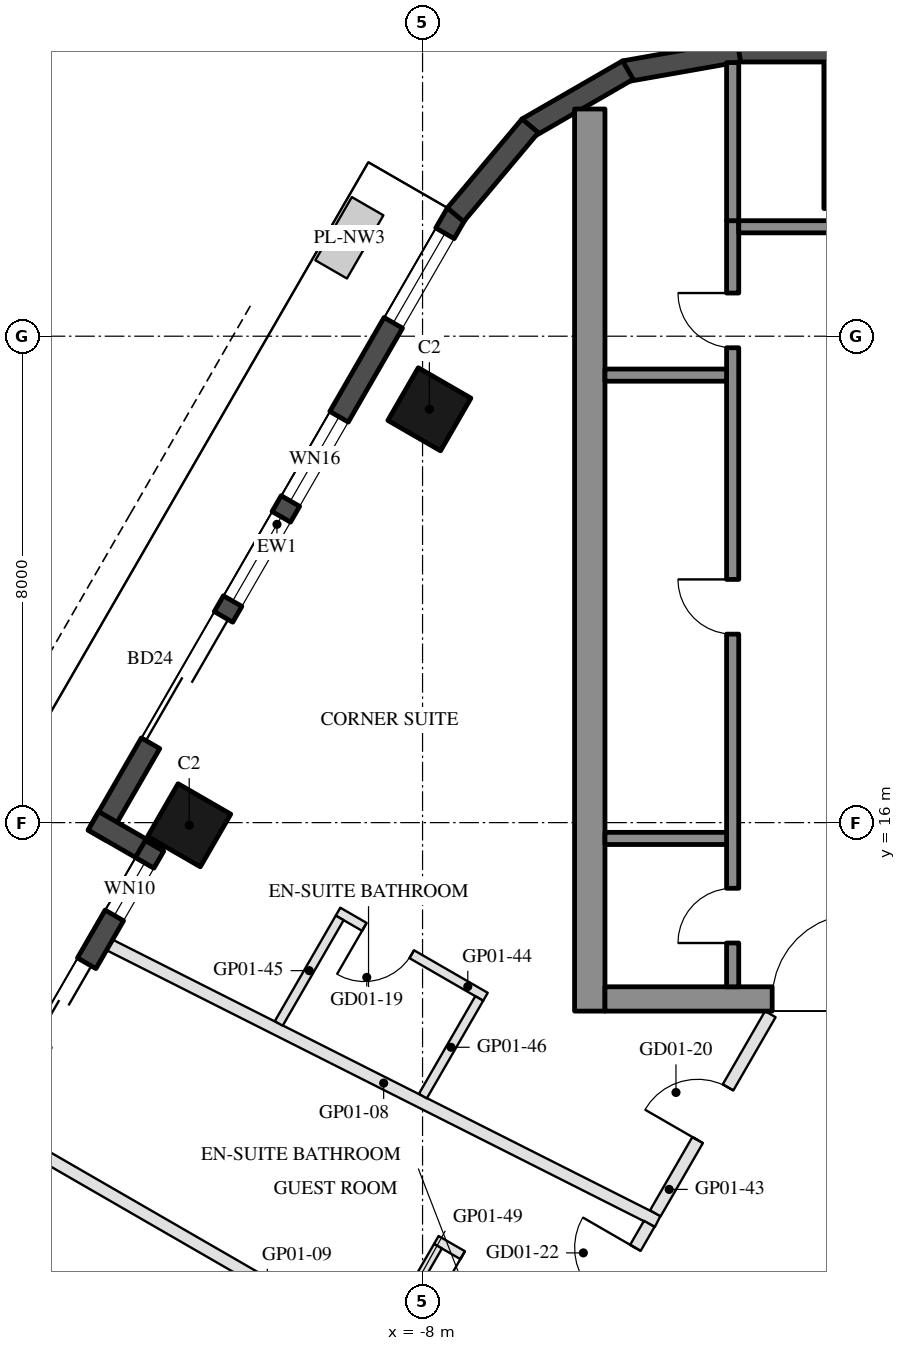
"""IFC4 building model, lengths in metres.
Left out: names, types, materials, properties, quantities, classifications, styles, units other than length and angle.
Written with IfcOpenShell. Run it as: python <this file> out.ifc"""

import sys

from ifc_helpers import new_model, si_unit, direction, frame, frame_2d, origin, origin_2d, place, context, subcontext, project, spatial, rectangle, hollow_rectangle, extrude, element, fill, save


model = new_model("IFC4")
c1 = context("Model", 3, precision=1e-05, world=origin(), true_north=direction((0.0, 1.0)))
c2 = subcontext(c1, "Body", "Model", "MODEL_VIEW")
j1 = project(units=[si_unit("LENGTHUNIT", "METRE"), si_unit("PLANEANGLEUNIT", "RADIAN")], contexts=[c1])
p1 = place(None, origin())
s1 = spatial("IfcSite", under=j1, at=p1, CompositionType="ELEMENT")
p2 = place(p1, origin())
s2 = spatial("IfcBuilding", under=s1, at=p2, CompositionType="ELEMENT")
p3 = place(p2, frame((0.0, 0.0, 46.5)))
s3 = spatial("IfcBuildingStorey", under=s2, at=p3, CompositionType="ELEMENT", Elevation=46.5)
for number, where, z_axis, x_axis in (
    (1, (-7.888, 22.798, 0.0), (0.0, 0.0, 1.0), (0.5, 0.866, 0.0)),
    (2, (-11.838, 15.957, 0.0), (0.0, 0.0, 1.0), (0.5, 0.866, 0.0)),
):
    element("IfcColumn", number, at=place(p3, frame(where, z_axis=z_axis, x_axis=x_axis)), inside=s3, PredefinedType="COLUMN", context=c2, shape_type="SweptSolid", body=[
        extrude(hollow_rectangle(XDim=1.0, YDim=1.0, WallThickness=0.045, at=origin_2d()), origin(), (0.0, 0.0, 1.0), 3.7),
    ])
p4 = place(p3, frame((0.0, 27.3, 0.0), z_axis=(0.0, 0.0, 1.0), x_axis=(1.0, 0.0, 0.0)))
e3 = element("IfcColumn", 3, at=p4, inside=s3, PredefinedType="COLUMN", context=c2, shape_type="SweptSolid", body=[
    extrude(hollow_rectangle(XDim=2.8, YDim=2.4, WallThickness=0.07, at=origin_2d()), origin(), (0.0, 0.0, 1.0), 3.7),
])
p5 = place(p3, frame((-7.441, 26.022, 0.0), z_axis=(0.0, 0.0, 1.0), x_axis=(-0.499992533062, -0.86602971478, 0.0)))
e4 = element("IfcWall", 4, at=p5, inside=s3, PredefinedType="SOLIDWALL", context=c2, shape_type="SweptSolid", body=[
    extrude(rectangle(XDim=11.816, YDim=0.35, at=frame_2d((5.908, 0.0))), origin(), (0.0, 0.0, 1.0), 3.55),
])
p6 = place(p5, frame((0.381, 0.0, 0.3)))
e5 = element("IfcOpeningElement", 5, at=p6, cuts=e4, PredefinedType="OPENING", context=c2, shape_type="SweptSolid", body=[
    extrude(rectangle(XDim=1.7, YDim=2.65, at=frame_2d((0.85, 1.325))), frame((0.0, 0.185, 0.0), z_axis=(0.0, -1.0, 0.0), x_axis=(1.0, 0.0, 0.0)), (0.0, 0.0, 1.0), 0.37),
])
p7 = place(p5, frame((7.666, 0.0, 0.0)))
e6 = element("IfcOpeningElement", 6, at=p7, cuts=e4, PredefinedType="OPENING", context=c2, shape_type="SweptSolid", body=[
    extrude(rectangle(XDim=2.4, YDim=2.4, at=frame_2d((1.2, 1.2))), frame((0.0, 0.185, 0.0), z_axis=(0.0, -1.0, 0.0), x_axis=(1.0, 0.0, 0.0)), (0.0, 0.0, 1.0), 0.37),
])
p8 = place(p5, frame((3.865, 0.0, 0.3)))
e7 = element("IfcOpeningElement", 7, at=p8, cuts=e4, PredefinedType="OPENING", context=c2, shape_type="SweptSolid", body=[
    extrude(rectangle(XDim=1.6, YDim=2.65, at=frame_2d((0.8, 1.325))), frame((0.0, 0.185, 0.0), z_axis=(0.0, -1.0, 0.0), x_axis=(1.0, 0.0, 0.0)), (0.0, 0.0, 1.0), 0.37),
])
p9 = place(p5, frame((5.765, 0.0, 0.3)))
e8 = element("IfcOpeningElement", 8, at=p9, cuts=e4, PredefinedType="OPENING", context=c2, shape_type="SweptSolid", body=[
    extrude(rectangle(XDim=1.6, YDim=2.65, at=frame_2d((0.8, 1.325))), frame((0.0, 0.185, 0.0), z_axis=(0.0, -1.0, 0.0), x_axis=(1.0, 0.0, 0.0)), (0.0, 0.0, 1.0), 0.37),
])
p10 = place(p3, frame((-13.413, 16.029, 0.0), z_axis=(0.0, 0.0, 1.0), x_axis=(0.866005645448, -0.500034220881, 0.0)))
e9 = element("IfcWall", 9, at=p10, inside=s3, PredefinedType="SOLIDWALL", context=c2, shape_type="SweptSolid", body=[
    extrude(rectangle(XDim=1.22, YDim=0.35, at=frame_2d((0.61, 0.0))), origin(), (0.0, 0.0, 1.0), 3.55),
])
p11 = place(p3, frame((-12.409, 15.617, 0.0), z_axis=(0.0, 0.0, 1.0), x_axis=(-0.500003597184, -0.866023326939, 0.0)))
e10 = element("IfcWall", 10, at=p11, inside=s3, PredefinedType="SOLIDWALL", context=c2, shape_type="SweptSolid", body=[
    extrude(rectangle(XDim=6.74, YDim=0.35, at=frame_2d((3.37, 0.0))), origin(), (0.0, 0.0, 1.0), 3.55),
])
p12 = place(p11, frame((0.32, 0.0, 0.3)))
e11 = element("IfcOpeningElement", 11, at=p12, cuts=e10, PredefinedType="OPENING", context=c2, shape_type="SweptSolid", body=[
    extrude(rectangle(XDim=1.0, YDim=2.65, at=frame_2d((0.5, 1.325))), frame((0.0, 0.185, 0.0), z_axis=(0.0, -1.0, 0.0), x_axis=(1.0, 0.0, 0.0)), (0.0, 0.0, 1.0), 0.37),
])
p13 = place(p11, frame((2.229, 0.0, 0.0)))
e12 = element("IfcOpeningElement", 12, at=p13, cuts=e10, PredefinedType="OPENING", context=c2, shape_type="SweptSolid", body=[
    extrude(rectangle(XDim=1.5, YDim=2.4, at=frame_2d((0.75, 1.2))), frame((0.0, 0.185, 0.0), z_axis=(0.0, -1.0, 0.0), x_axis=(1.0, 0.0, 0.0)), (0.0, 0.0, 1.0), 0.37),
])
p14 = place(p11, frame((4.029, 0.0, 0.3)))
e13 = element("IfcOpeningElement", 13, at=p14, cuts=e10, PredefinedType="OPENING", context=c2, shape_type="SweptSolid", body=[
    extrude(rectangle(XDim=0.8, YDim=2.65, at=frame_2d((0.4, 1.325))), frame((0.0, 0.185, 0.0), z_axis=(0.0, -1.0, 0.0), x_axis=(1.0, 0.0, 0.0)), (0.0, 0.0, 1.0), 0.37),
])
p15 = place(p3, frame((2.829, 28.685, 0.0), z_axis=(0.0, 0.0, 1.0), x_axis=(-1.0, 0.0, 0.0)))
e14 = element("IfcWall", 14, at=p15, inside=s3, PredefinedType="SOLIDWALL", context=c2, shape_type="SweptSolid", body=[
    extrude(rectangle(XDim=5.658, YDim=0.35, at=frame_2d((2.829, 0.0))), origin(), (0.0, 0.0, 1.0), 3.55),
])
for number, where, z_axis, x_axis in (
    (15, (-2.799, 28.688, 0.0), (0.0, 0.0, 1.0), (-0.985, -0.174, 0.0)),
    (16, (-4.623, 28.377, 0.0), (0.0, 0.0, 1.0), (-0.866, -0.5, 0.0)),
):
    element("IfcWall", number, at=place(p3, frame(where, z_axis=z_axis, x_axis=x_axis)), inside=s3, PredefinedType="SOLIDWALL", context=c2, shape_type="SweptSolid", body=[
        extrude(rectangle(XDim=1.91, YDim=0.35, at=frame_2d((0.955, 0.0))), origin(), (0.0, 0.0, 1.0), 3.55),
    ])
p16 = place(p3, frame((-6.23, 27.461, 0.0), z_axis=(0.0, 0.0, 1.0), x_axis=(-0.642808304945, -0.766027077259, 0.0)))
e17 = element("IfcWall", 17, at=p16, inside=s3, PredefinedType="SOLIDWALL", context=c2, shape_type="SweptSolid", body=[
    extrude(rectangle(XDim=1.91, YDim=0.35, at=frame_2d((0.955, 0.0))), origin(), (0.0, 0.0, 1.0), 3.55),
])
p17 = place(p3, frame((-5.25, 12.9, 0.0), z_axis=(0.0, 0.0, 1.0), x_axis=(0.0, 1.0, 0.0)))
e18 = element("IfcWall", 18, at=p17, inside=s3, PredefinedType="SHEAR", context=c2, shape_type="SweptSolid", body=[
    extrude(rectangle(XDim=14.837, YDim=0.5, at=frame_2d((7.418, 0.0))), origin(), (0.0, 0.0, 1.0), 3.5),
])
p18 = place(p3, frame((5.0, 13.1, 0.0), z_axis=(0.0, 0.0, 1.0), x_axis=(-1.0, 0.0, 0.0)))
e19 = element("IfcWall", 19, at=p18, inside=s3, PredefinedType="SHEAR", context=c2, shape_type="SweptSolid", body=[
    extrude(rectangle(XDim=10.0, YDim=0.4, at=frame_2d((5.0, 0.0))), origin(), (0.0, 0.0, 1.0), 3.5),
])
p19 = place(p18, frame((3.55, 0.0, 0.0)))
e20 = element("IfcOpeningElement", 20, at=p19, cuts=e19, PredefinedType="OPENING", context=c2, shape_type="SweptSolid", body=[
    extrude(rectangle(XDim=1.1, YDim=2.1, at=frame_2d((0.55, 1.05))), frame((0.0, 0.21, 0.0), z_axis=(0.0, -1.0, 0.0), x_axis=(1.0, 0.0, 0.0)), (0.0, 0.0, 1.0), 0.42),
])
p20 = place(p18, frame((5.85, 0.0, 0.0)))
e21 = element("IfcOpeningElement", 21, at=p20, cuts=e19, PredefinedType="OPENING", context=c2, shape_type="SweptSolid", body=[
    extrude(rectangle(XDim=1.4, YDim=2.1, at=frame_2d((0.7, 1.05))), frame((0.0, 0.21, 0.0), z_axis=(0.0, -1.0, 0.0), x_axis=(1.0, 0.0, 0.0)), (0.0, 0.0, 1.0), 0.42),
])
p21 = place(p3, frame((-2.9, 13.3, 0.0), z_axis=(0.0, 0.0, 1.0), x_axis=(0.0, 1.0, 0.0)))
e22 = element("IfcWall", 22, at=p21, inside=s3, PredefinedType="SHEAR", context=c2, shape_type="SweptSolid", body=[
    extrude(rectangle(XDim=12.6, YDim=0.2, at=frame_2d((6.3, 0.0))), origin(), (0.0, 0.0, 1.0), 3.5),
])
p22 = place(p21, frame((0.72, 0.0, 0.0)))
e23 = element("IfcOpeningElement", 23, at=p22, cuts=e22, PredefinedType="OPENING", context=c2, shape_type="SweptSolid", body=[
    extrude(rectangle(XDim=0.9, YDim=2.1, at=frame_2d((0.45, 1.05))), frame((0.0, 0.11, 0.0), z_axis=(0.0, -1.0, 0.0), x_axis=(1.0, 0.0, 0.0)), (0.0, 0.0, 1.0), 0.22),
])
p23 = place(p21, frame((5.8, 0.0, 0.0)))
e24 = element("IfcOpeningElement", 24, at=p23, cuts=e22, PredefinedType="OPENING", context=c2, shape_type="SweptSolid", body=[
    extrude(rectangle(XDim=0.9, YDim=2.1, at=frame_2d((0.45, 1.05))), frame((0.0, 0.11, 0.0), z_axis=(0.0, -1.0, 0.0), x_axis=(1.0, 0.0, 0.0)), (0.0, 0.0, 1.0), 0.22),
])
p24 = place(p21, frame((10.51, 0.0, 0.0)))
e25 = element("IfcOpeningElement", 25, at=p24, cuts=e22, PredefinedType="OPENING", context=c2, shape_type="SweptSolid", body=[
    extrude(rectangle(XDim=0.9, YDim=2.1, at=frame_2d((0.45, 1.05))), frame((0.0, 0.11, 0.0), z_axis=(0.0, -1.0, 0.0), x_axis=(1.0, 0.0, 0.0)), (0.0, 0.0, 1.0), 0.22),
])
p25 = place(p3, frame((-0.4, 25.8, 0.0), z_axis=(0.0, 0.0, 1.0), x_axis=(-1.0, 0.0, 0.0)))
e26 = element("IfcWall", 26, at=p25, inside=s3, PredefinedType="SHEAR", context=c2, shape_type="SweptSolid", body=[
    extrude(rectangle(XDim=2.4, YDim=0.2, at=frame_2d((1.2, 0.0))), origin(), (0.0, 0.0, 1.0), 3.5),
])
for number, where, z_axis, x_axis in (
    (27, (-3.0, 15.74, 0.0), (0.0, 0.0, 1.0), (-1.0, 0.0, 0.0)),
    (28, (-3.0, 23.36, 0.0), (0.0, 0.0, 1.0), (-1.0, 0.0, 0.0)),
):
    element("IfcWall", number, at=place(p3, frame(where, z_axis=z_axis, x_axis=x_axis)), inside=s3, PredefinedType="SHEAR", context=c2, shape_type="SweptSolid", body=[
        extrude(rectangle(XDim=2.0, YDim=0.2, at=frame_2d((1.0, 0.0))), origin(), (0.0, 0.0, 1.0), 3.5),
    ])
p26 = place(p3, frame((-2.9, 25.9, 0.0), z_axis=(0.0, 0.0, 1.0), x_axis=(0.0, 1.0, 0.0)))
e29 = element("IfcWall", 29, at=p26, inside=s3, PredefinedType="SHEAR", context=c2, shape_type="SweptSolid", body=[
    extrude(rectangle(XDim=2.6, YDim=0.2, at=frame_2d((1.3, 0.0))), origin(), (0.0, 0.0, 1.0), 3.5),
])
p27 = place(p3, frame((-13.147, 13.989, 0.0), z_axis=(0.0, 0.0, 1.0), x_axis=(0.892898572595, -0.450257858408, 0.0)))
e30 = element("IfcWall", 30, at=p27, inside=s3, PredefinedType="PARTITIONING", context=c2, shape_type="SweptSolid", body=[
    extrude(rectangle(XDim=10.096, YDim=0.2, at=frame_2d((5.048, 0.0))), origin(), (0.0, 0.0, 1.0), 2.96),
])
p28 = place(p3, frame((-14.917, 10.922, 0.0), z_axis=(0.0, 0.0, 1.0), x_axis=(0.866022637375, -0.500004791531, 0.0)))
e31 = element("IfcWall", 31, at=p28, inside=s3, PredefinedType="PARTITIONING", context=c2, shape_type="SweptSolid", body=[
    extrude(rectangle(XDim=10.08, YDim=0.2, at=frame_2d((5.04, 0.0))), origin(), (0.0, 0.0, 1.0), 2.96),
])
p29 = place(p3, frame((-4.172, 9.574, 0.0), z_axis=(0.0, 0.0, 1.0), x_axis=(0.499985062256, 0.866034027923, 0.0)))
e32 = element("IfcWall", 32, at=p29, inside=s3, PredefinedType="PARTITIONING", context=c2, shape_type="SweptSolid", body=[
    extrude(rectangle(XDim=3.782, YDim=0.2, at=frame_2d((1.891, 0.0))), origin(), (0.0, 0.0, 1.0), 2.95),
])
p30 = place(p29, frame((1.391, 0.0, 0.0)))
e33 = element("IfcOpeningElement", 33, at=p30, cuts=e32, PredefinedType="OPENING", context=c2, shape_type="SweptSolid", body=[
    extrude(rectangle(XDim=1.0, YDim=2.1, at=frame_2d((0.5, 1.05))), frame((0.0, 0.11, 0.0), z_axis=(0.0, -1.0, 0.0), x_axis=(1.0, 0.0, 0.0)), (0.0, 0.0, 1.0), 0.22),
])
p31 = place(p3, frame((-6.965, 13.136, 0.0), z_axis=(0.0, 0.0, 1.0), x_axis=(-0.866034573852, 0.49998411664, 0.0)))
e34 = element("IfcWall", 34, at=p31, inside=s3, PredefinedType="PARTITIONING", context=c2, shape_type="SweptSolid", body=[
    extrude(rectangle(XDim=2.8, YDim=0.15, at=frame_2d((1.4, 0.0))), origin(), (0.0, 0.0, 1.0), 2.95),
])
p32 = place(p31, frame((1.4, 0.0, 0.0)))
e35 = element("IfcOpeningElement", 35, at=p32, cuts=e34, PredefinedType="OPENING", context=c2, shape_type="SweptSolid", body=[
    extrude(rectangle(XDim=0.9, YDim=2.1, at=frame_2d((0.45, 1.05))), frame((0.0, 0.085, 0.0), z_axis=(0.0, -1.0, 0.0), x_axis=(1.0, 0.0, 0.0)), (0.0, 0.0, 1.0), 0.17),
])
p33 = place(p3, frame((-9.363, 14.433, 0.0), z_axis=(0.0, 0.0, 1.0), x_axis=(-0.500056363668, -0.86599285976, 0.0)))
e36 = element("IfcWall", 36, at=p33, inside=s3, PredefinedType="PARTITIONING", context=c2, shape_type="SweptSolid", body=[
    extrude(rectangle(XDim=2.004, YDim=0.15, at=frame_2d((1.002, 0.0))), origin(), (0.0, 0.0, 1.0), 2.95),
])
p34 = place(p3, frame((-7.068, 13.108, 0.0), z_axis=(0.0, 0.0, 1.0), x_axis=(-0.4999770169, -0.866038672677, 0.0)))
e37 = element("IfcWall", 37, at=p34, inside=s3, PredefinedType="PARTITIONING", context=c2, shape_type="SweptSolid", body=[
    extrude(rectangle(XDim=1.854, YDim=0.15, at=frame_2d((0.927, 0.0))), origin(), (0.0, 0.0, 1.0), 2.95),
])
p35 = place(p3, frame((-6.225, 6.019, 0.0), z_axis=(0.0, 0.0, 1.0), x_axis=(0.499998439657, 0.866026304647, 0.0)))
e38 = element("IfcWall", 38, at=p35, inside=s3, PredefinedType="PARTITIONING", context=c2, shape_type="SweptSolid", body=[
    extrude(rectangle(XDim=3.905, YDim=0.2, at=frame_2d((1.953, 0.0))), origin(), (0.0, 0.0, 1.0), 2.95),
])
p36 = place(p35, frame((2.45, 0.0, 0.0)))
e39 = element("IfcOpeningElement", 39, at=p36, cuts=e38, PredefinedType="OPENING", context=c2, shape_type="SweptSolid", body=[
    extrude(rectangle(XDim=1.0, YDim=2.1, at=frame_2d((0.5, 1.05))), frame((0.0, 0.11, 0.0), z_axis=(0.0, -1.0, 0.0), x_axis=(1.0, 0.0, 0.0)), (0.0, 0.0, 1.0), 0.22),
])
p37 = place(p3, frame((-5.349, 7.736, 0.0), z_axis=(0.0, 0.0, 1.0), x_axis=(-0.866056369097, 0.49994636267, 0.0)))
e40 = element("IfcWall", 40, at=p37, inside=s3, PredefinedType="PARTITIONING", context=c2, shape_type="SweptSolid", body=[
    extrude(rectangle(XDim=2.8, YDim=0.15, at=frame_2d((1.4, 0.0))), origin(), (0.0, 0.0, 1.0), 2.95),
])
p38 = place(p37, frame((1.4, 0.0, 0.0)))
e41 = element("IfcOpeningElement", 41, at=p38, cuts=e40, PredefinedType="OPENING", context=c2, shape_type="SweptSolid", body=[
    extrude(rectangle(XDim=0.9, YDim=2.1, at=frame_2d((0.45, 1.05))), frame((0.0, 0.085, 0.0), z_axis=(0.0, -1.0, 0.0), x_axis=(1.0, 0.0, 0.0)), (0.0, 0.0, 1.0), 0.17),
])
p39 = place(p3, frame((-7.746, 9.033, 0.0), z_axis=(0.0, 0.0, 1.0), x_axis=(-0.500042316284, -0.866000971088, 0.0)))
e42 = element("IfcWall", 42, at=p39, inside=s3, PredefinedType="PARTITIONING", context=c2, shape_type="SweptSolid", body=[
    extrude(rectangle(XDim=1.85, YDim=0.15, at=frame_2d((0.925, 0.0))), origin(), (0.0, 0.0, 1.0), 2.95),
])
p40 = place(p6, origin())
e43 = element("IfcWindow", 43, at=p40, inside=s3, PartitioningType="SINGLE_PANEL", PredefinedType="WINDOW", context=c2, shape_type="SweptSolid", body=[
    extrude(rectangle(XDim=1.7, YDim=2.65, at=frame_2d((0.85, 1.325))), frame((0.0, 0.03, 0.0), z_axis=(0.0, -1.0, 0.0), x_axis=(1.0, 0.0, 0.0)), (0.0, 0.0, 1.0), 0.06),
])
fill(e5, e43)
p41 = place(p7, frame((2.4, 0.0, 0.0), z_axis=(0.0, 0.0, 1.0), x_axis=(-1.0, 0.0, 0.0)))
e44 = element("IfcDoor", 44, at=p41, inside=s3, OperationType="SLIDING_TO_LEFT", PredefinedType="DOOR", context=c2, shape_type="SweptSolid", body=[
    extrude(rectangle(XDim=2.4, YDim=2.4, at=frame_2d((1.2, 1.2))), frame((0.0, 0.025, 0.0), z_axis=(0.0, -1.0, 0.0), x_axis=(1.0, 0.0, 0.0)), (0.0, 0.0, 1.0), 0.05),
])
fill(e6, e44)
p42 = place(p8, origin())
e45 = element("IfcWindow", 45, at=p42, inside=s3, PartitioningType="SINGLE_PANEL", PredefinedType="WINDOW", context=c2, shape_type="SweptSolid", body=[
    extrude(rectangle(XDim=1.6, YDim=2.65, at=frame_2d((0.8, 1.325))), frame((0.0, 0.03, 0.0), z_axis=(0.0, -1.0, 0.0), x_axis=(1.0, 0.0, 0.0)), (0.0, 0.0, 1.0), 0.06),
])
fill(e7, e45)
p43 = place(p9, origin())
e46 = element("IfcWindow", 46, at=p43, inside=s3, PartitioningType="SINGLE_PANEL", PredefinedType="WINDOW", context=c2, shape_type="SweptSolid", body=[
    extrude(rectangle(XDim=1.6, YDim=2.65, at=frame_2d((0.8, 1.325))), frame((0.0, 0.03, 0.0), z_axis=(0.0, -1.0, 0.0), x_axis=(1.0, 0.0, 0.0)), (0.0, 0.0, 1.0), 0.06),
])
fill(e8, e46)
p44 = place(p12, origin())
e47 = element("IfcWindow", 47, at=p44, inside=s3, PartitioningType="SINGLE_PANEL", PredefinedType="WINDOW", context=c2, shape_type="SweptSolid", body=[
    extrude(rectangle(XDim=1.0, YDim=2.65, at=frame_2d((0.5, 1.325))), frame((0.0, 0.03, 0.0), z_axis=(0.0, -1.0, 0.0), x_axis=(1.0, 0.0, 0.0)), (0.0, 0.0, 1.0), 0.06),
])
fill(e11, e47)
p45 = place(p13, frame((1.5, 0.0, 0.0), z_axis=(0.0, 0.0, 1.0), x_axis=(-1.0, 0.0, 0.0)))
e48 = element("IfcDoor", 48, at=p45, inside=s3, OperationType="SLIDING_TO_LEFT", PredefinedType="DOOR", context=c2, shape_type="SweptSolid", body=[
    extrude(rectangle(XDim=1.5, YDim=2.4, at=frame_2d((0.75, 1.2))), frame((0.0, 0.025, 0.0), z_axis=(0.0, -1.0, 0.0), x_axis=(1.0, 0.0, 0.0)), (0.0, 0.0, 1.0), 0.05),
])
fill(e12, e48)
p46 = place(p22, origin())
e49 = element("IfcDoor", 49, at=p46, inside=s3, OperationType="SINGLE_SWING_LEFT", PredefinedType="DOOR", context=c2, shape_type="SweptSolid", body=[
    extrude(rectangle(XDim=0.9, YDim=2.1, at=frame_2d((0.45, 1.05))), frame((0.0, 0.025, 0.0), z_axis=(0.0, -1.0, 0.0), x_axis=(1.0, 0.0, 0.0)), (0.0, 0.0, 1.0), 0.05),
])
fill(e23, e49)
p47 = place(p23, origin())
e50 = element("IfcDoor", 50, at=p47, inside=s3, OperationType="SINGLE_SWING_RIGHT", PredefinedType="DOOR", context=c2, shape_type="SweptSolid", body=[
    extrude(rectangle(XDim=0.9, YDim=2.1, at=frame_2d((0.45, 1.05))), frame((0.0, 0.025, 0.0), z_axis=(0.0, -1.0, 0.0), x_axis=(1.0, 0.0, 0.0)), (0.0, 0.0, 1.0), 0.05),
])
fill(e24, e50)
p48 = place(p24, origin())
e51 = element("IfcDoor", 51, at=p48, inside=s3, OperationType="SINGLE_SWING_RIGHT", PredefinedType="DOOR", context=c2, shape_type="SweptSolid", body=[
    extrude(rectangle(XDim=0.9, YDim=2.1, at=frame_2d((0.45, 1.05))), frame((0.0, 0.025, 0.0), z_axis=(0.0, -1.0, 0.0), x_axis=(1.0, 0.0, 0.0)), (0.0, 0.0, 1.0), 0.05),
])
fill(e25, e51)
p49 = place(p20, frame((1.4, 0.0, 0.0), z_axis=(0.0, 0.0, 1.0), x_axis=(-1.0, 0.0, 0.0)))
e52 = element("IfcDoor", 52, at=p49, inside=s3, OperationType="DOUBLE_DOOR_SINGLE_SWING", PredefinedType="DOOR", context=c2, shape_type="SweptSolid", body=[
    extrude(rectangle(XDim=1.4, YDim=2.1, at=frame_2d((0.7, 1.05))), frame((0.0, 0.025, 0.0), z_axis=(0.0, -1.0, 0.0), x_axis=(1.0, 0.0, 0.0)), (0.0, 0.0, 1.0), 0.05),
])
fill(e21, e52)
p50 = place(p32, origin())
e53 = element("IfcDoor", 53, at=p50, inside=s3, OperationType="SINGLE_SWING_RIGHT", PredefinedType="DOOR", context=c2, shape_type="SweptSolid", body=[
    extrude(rectangle(XDim=0.9, YDim=2.1, at=frame_2d((0.45, 1.05))), frame((0.0, 0.025, 0.0), z_axis=(0.0, -1.0, 0.0), x_axis=(1.0, 0.0, 0.0)), (0.0, 0.0, 1.0), 0.05),
])
fill(e35, e53)
p51 = place(p30, origin())
e54 = element("IfcDoor", 54, at=p51, inside=s3, OperationType="SINGLE_SWING_LEFT", PredefinedType="DOOR", context=c2, shape_type="SweptSolid", body=[
    extrude(rectangle(XDim=1.0, YDim=2.1, at=frame_2d((0.5, 1.05))), frame((0.0, 0.025, 0.0), z_axis=(0.0, -1.0, 0.0), x_axis=(1.0, 0.0, 0.0)), (0.0, 0.0, 1.0), 0.05),
])
fill(e33, e54)
p52 = place(p38, origin())
e55 = element("IfcDoor", 55, at=p52, inside=s3, OperationType="SINGLE_SWING_RIGHT", PredefinedType="DOOR", context=c2, shape_type="SweptSolid", body=[
    extrude(rectangle(XDim=0.9, YDim=2.1, at=frame_2d((0.45, 1.05))), frame((0.0, 0.025, 0.0), z_axis=(0.0, -1.0, 0.0), x_axis=(1.0, 0.0, 0.0)), (0.0, 0.0, 1.0), 0.05),
])
fill(e41, e55)
p53 = place(p36, origin())
e56 = element("IfcDoor", 56, at=p53, inside=s3, OperationType="SINGLE_SWING_RIGHT", PredefinedType="DOOR", context=c2, shape_type="SweptSolid", body=[
    extrude(rectangle(XDim=1.0, YDim=2.1, at=frame_2d((0.5, 1.05))), frame((0.0, 0.025, 0.0), z_axis=(0.0, -1.0, 0.0), x_axis=(1.0, 0.0, 0.0)), (0.0, 0.0, 1.0), 0.05),
])
fill(e39, e56)
save(model, sys.argv[1])
